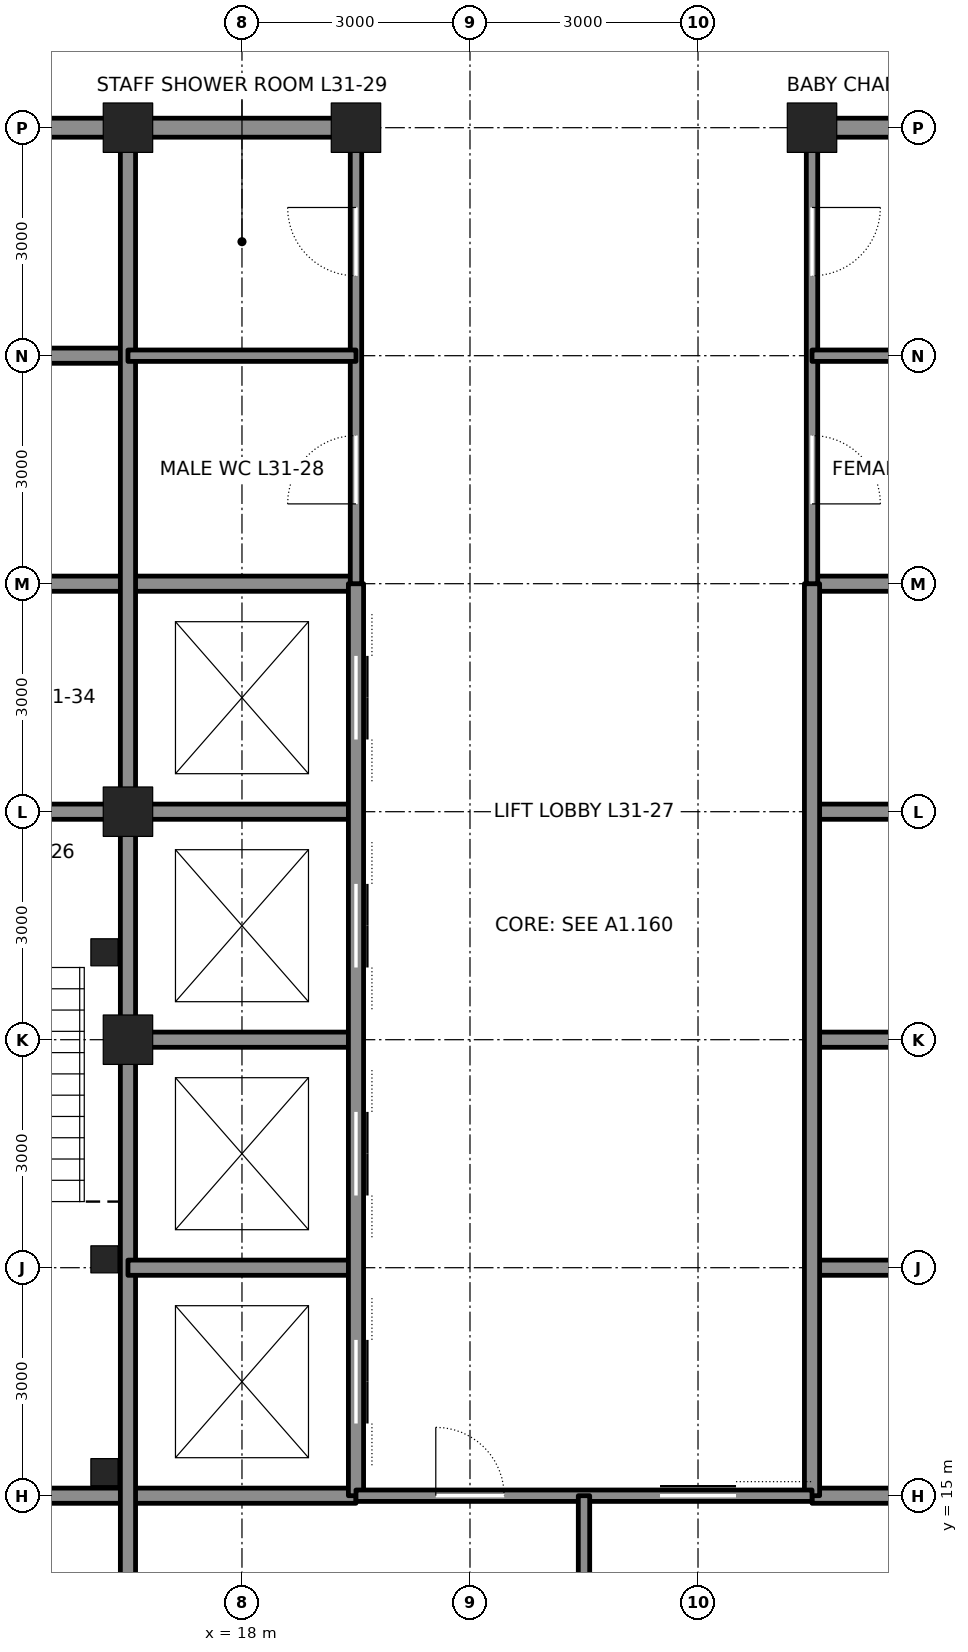
"""IFC4 building model, lengths in metres.
Left out: names, types, materials, properties, quantities, classifications, styles, units other than length and angle.
Written with IfcOpenShell. Run it as: python <this file> out.ifc"""

import sys

from ifc_helpers import new_model, si_unit, direction, frame, frame_2d, origin, origin_2d, place, context, subcontext, project, spatial, rectangle, hollow_rectangle, extrude, element, fill, save


model = new_model("IFC4")
c1 = context("Model", 3, precision=1e-05, world=origin(), true_north=direction((0.0, 1.0)))
c2 = subcontext(c1, "Body", "Model", "MODEL_VIEW")
j1 = project(units=[si_unit("LENGTHUNIT", "METRE"), si_unit("PLANEANGLEUNIT", "RADIAN")], contexts=[c1])
p1 = place(None, origin())
s1 = spatial("IfcSite", under=j1, at=p1, CompositionType="ELEMENT")
p2 = place(p1, origin())
s2 = spatial("IfcBuilding", under=s1, at=p2, CompositionType="ELEMENT")
p3 = place(p2, frame((0.0, 0.0, 144.6)))
s3 = spatial("IfcBuildingStorey", under=s2, at=p3, CompositionType="ELEMENT", Elevation=144.6)
for number, where, z_axis, x_axis in (
    (1, (16.5, 33.0, 0.0), (0.0, 0.0, 1.0), (1.0, 0.0, 0.0)),
    (2, (19.5, 33.0, 0.0), (0.0, 0.0, 1.0), (1.0, 0.0, 0.0)),
    (3, (25.5, 33.0, 0.0), (0.0, 0.0, 1.0), (1.0, 0.0, 0.0)),
    (4, (16.5, 21.0, 0.0), (0.0, 0.0, 1.0), (1.0, 0.0, 0.0)),
    (5, (16.5, 24.0, 0.0), (0.0, 0.0, 1.0), (1.0, 0.0, 0.0)),
):
    element("IfcColumn", number, at=place(p3, frame(where, z_axis=z_axis, x_axis=x_axis)), inside=s3, PredefinedType="COLUMN", context=c2, shape_type="SweptSolid", body=[
        extrude(hollow_rectangle(XDim=0.65, YDim=0.65, WallThickness=0.065, at=origin_2d()), origin(), (0.0, 0.0, 1.0), 4.2),
    ])
for number, where, z_axis, x_axis in (
    (6, (12.0, 15.0, 0.0), (0.0, 0.0, 1.0), (1.0, 0.0, 0.0)),
    (7, (25.5, 15.0, 0.0), (0.0, 0.0, 1.0), (1.0, 0.0, 0.0)),
):
    element("IfcWall", number, at=place(p3, frame(where, z_axis=z_axis, x_axis=x_axis)), inside=s3, PredefinedType="SOLIDWALL", context=c2, shape_type="SweptSolid", body=[
        extrude(rectangle(XDim=7.5, YDim=0.2, at=frame_2d((3.75, 0.0))), origin(), (0.0, 0.0, 1.0), 4.04),
    ])
p4 = place(p3, frame((12.25, 24.0, 0.0), z_axis=(0.0, 0.0, 1.0), x_axis=(1.0, 0.0, 0.0)))
e8 = element("IfcWall", 8, at=p4, inside=s3, PredefinedType="SOLIDWALL", context=c2, shape_type="SweptSolid", body=[
    extrude(rectangle(XDim=4.0, YDim=0.2, at=frame_2d((2.0, 0.0))), origin(), (0.0, 0.0, 1.0), 3.09),
])
p5 = place(p4, frame((1.4, 0.0, 0.0)))
e9 = element("IfcOpeningElement", 9, at=p5, cuts=e8, PredefinedType="OPENING", context=c2, shape_type="SweptSolid", body=[
    extrude(rectangle(XDim=1.2, YDim=2.1, at=frame_2d((0.6, 1.05))), frame((0.0, 0.11, 0.0), z_axis=(0.0, -1.0, 0.0), x_axis=(1.0, 0.0, 0.0)), (0.0, 0.0, 1.0), 0.22),
])
for number, where, z_axis, x_axis in (
    (10, (16.75, 24.0, 0.0), (0.0, 0.0, 1.0), (1.0, 0.0, 0.0)),
    (11, (25.5, 24.0, 0.0), (0.0, 0.0, 1.0), (1.0, 0.0, 0.0)),
):
    element("IfcWall", number, at=place(p3, frame(where, z_axis=z_axis, x_axis=x_axis)), inside=s3, PredefinedType="SOLIDWALL", context=c2, shape_type="SweptSolid", body=[
        extrude(rectangle(XDim=2.75, YDim=0.2, at=frame_2d((1.375, 0.0))), origin(), (0.0, 0.0, 1.0), 3.09),
    ])
p6 = place(p3, frame((12.0, 27.0, 0.0), z_axis=(0.0, 0.0, 1.0), x_axis=(1.0, 0.0, 0.0)))
e12 = element("IfcWall", 12, at=p6, inside=s3, PredefinedType="SOLIDWALL", context=c2, shape_type="SweptSolid", body=[
    extrude(rectangle(XDim=7.5, YDim=0.2, at=frame_2d((3.75, 0.0))), origin(), (0.0, 0.0, 1.0), 4.04),
])
p7 = place(p6, frame((1.65, 0.0, 0.0)))
e13 = element("IfcOpeningElement", 13, at=p7, cuts=e12, PredefinedType="OPENING", context=c2, shape_type="SweptSolid", body=[
    extrude(rectangle(XDim=1.2, YDim=2.1, at=frame_2d((0.6, 1.05))), frame((0.0, 0.11, 0.0), z_axis=(0.0, -1.0, 0.0), x_axis=(1.0, 0.0, 0.0)), (0.0, 0.0, 1.0), 0.22),
])
p8 = place(p3, frame((25.5, 27.0, 0.0), z_axis=(0.0, 0.0, 1.0), x_axis=(1.0, 0.0, 0.0)))
e14 = element("IfcWall", 14, at=p8, inside=s3, PredefinedType="SOLIDWALL", context=c2, shape_type="SweptSolid", body=[
    extrude(rectangle(XDim=3.0, YDim=0.2, at=frame_2d((1.5, 0.0))), origin(), (0.0, 0.0, 1.0), 4.04),
])
p9 = place(p3, frame((12.0, 30.0, 0.0), z_axis=(0.0, 0.0, 1.0), x_axis=(1.0, 0.0, 0.0)))
e15 = element("IfcWall", 15, at=p9, inside=s3, PredefinedType="SOLIDWALL", context=c2, shape_type="SweptSolid", body=[
    extrude(rectangle(XDim=4.5, YDim=0.2, at=frame_2d((2.25, 0.0))), origin(), (0.0, 0.0, 1.0), 4.04),
])
p10 = place(p3, frame((12.25, 33.0, 0.0), z_axis=(0.0, 0.0, 1.0), x_axis=(1.0, 0.0, 0.0)))
e16 = element("IfcWall", 16, at=p10, inside=s3, PredefinedType="SOLIDWALL", context=c2, shape_type="SweptSolid", body=[
    extrude(rectangle(XDim=4.0, YDim=0.25, at=frame_2d((2.0, 0.0))), origin(), (0.0, 0.0, 1.0), 3.181),
])
for number, where, z_axis, x_axis in (
    (17, (16.75, 33.0, 0.0), (0.0, 0.0, 1.0), (1.0, 0.0, 0.0)),
    (18, (25.75, 33.0, 0.0), (0.0, 0.0, 1.0), (1.0, 0.0, 0.0)),
):
    element("IfcWall", number, at=place(p3, frame(where, z_axis=z_axis, x_axis=x_axis)), inside=s3, PredefinedType="SOLIDWALL", context=c2, shape_type="SweptSolid", body=[
        extrude(rectangle(XDim=2.5, YDim=0.25, at=frame_2d((1.25, 0.0))), origin(), (0.0, 0.0, 1.0), 3.181),
    ])
p11 = place(p3, frame((16.5, 12.25, 0.0), z_axis=(0.0, 0.0, 1.0), x_axis=(0.0, 1.0, 0.0)))
e19 = element("IfcWall", 19, at=p11, inside=s3, PredefinedType="SOLIDWALL", context=c2, shape_type="SweptSolid", body=[
    extrude(rectangle(XDim=8.5, YDim=0.2, at=frame_2d((4.25, 0.0))), origin(), (0.0, 0.0, 1.0), 3.113),
])
p12 = place(p3, frame((16.5, 21.25, 0.0), z_axis=(0.0, 0.0, 1.0), x_axis=(0.0, 1.0, 0.0)))
e20 = element("IfcWall", 20, at=p12, inside=s3, PredefinedType="SOLIDWALL", context=c2, shape_type="SweptSolid", body=[
    extrude(rectangle(XDim=2.5, YDim=0.2, at=frame_2d((1.25, 0.0))), origin(), (0.0, 0.0, 1.0), 3.113),
])
p13 = place(p3, frame((16.5, 24.25, 0.0), z_axis=(0.0, 0.0, 1.0), x_axis=(0.0, 1.0, 0.0)))
e21 = element("IfcWall", 21, at=p13, inside=s3, PredefinedType="SOLIDWALL", context=c2, shape_type="SweptSolid", body=[
    extrude(rectangle(XDim=8.5, YDim=0.2, at=frame_2d((4.25, 0.0))), origin(), (0.0, 0.0, 1.0), 3.113),
])
p14 = place(p3, frame((16.5, 18.0, 0.0), z_axis=(0.0, 0.0, 1.0), x_axis=(1.0, 0.0, 0.0)))
e22 = element("IfcWall", 22, at=p14, inside=s3, PredefinedType="SOLIDWALL", context=c2, shape_type="SweptSolid", body=[
    extrude(rectangle(XDim=3.0, YDim=0.2, at=frame_2d((1.5, 0.0))), origin(), (0.0, 0.0, 1.0), 4.04),
])
p15 = place(p3, frame((25.5, 18.0, 0.0), z_axis=(0.0, 0.0, 1.0), x_axis=(1.0, 0.0, 0.0)))
e23 = element("IfcWall", 23, at=p15, inside=s3, PredefinedType="SOLIDWALL", context=c2, shape_type="SweptSolid", body=[
    extrude(rectangle(XDim=7.5, YDim=0.2, at=frame_2d((3.75, 0.0))), origin(), (0.0, 0.0, 1.0), 4.04),
])
p16 = place(p15, frame((4.65, 0.0, 0.0)))
e24 = element("IfcOpeningElement", 24, at=p16, cuts=e23, PredefinedType="OPENING", context=c2, shape_type="SweptSolid", body=[
    extrude(rectangle(XDim=1.2, YDim=2.1, at=frame_2d((0.6, 1.05))), frame((0.0, 0.11, 0.0), z_axis=(0.0, -1.0, 0.0), x_axis=(1.0, 0.0, 0.0)), (0.0, 0.0, 1.0), 0.22),
])
for number, where, z_axis, x_axis in (
    (25, (16.75, 21.0, 0.0), (0.0, 0.0, 1.0), (1.0, 0.0, 0.0)),
    (26, (25.5, 21.0, 0.0), (0.0, 0.0, 1.0), (1.0, 0.0, 0.0)),
):
    element("IfcWall", number, at=place(p3, frame(where, z_axis=z_axis, x_axis=x_axis)), inside=s3, PredefinedType="SOLIDWALL", context=c2, shape_type="SweptSolid", body=[
        extrude(rectangle(XDim=2.75, YDim=0.2, at=frame_2d((1.375, 0.0))), origin(), (0.0, 0.0, 1.0), 3.09),
    ])
p17 = place(p3, frame((19.5, 15.0, 0.0), z_axis=(0.0, 0.0, 1.0), x_axis=(0.0, 1.0, 0.0)))
e27 = element("IfcWall", 27, at=p17, inside=s3, PredefinedType="SOLIDWALL", context=c2, shape_type="SweptSolid", body=[
    extrude(rectangle(XDim=12.0, YDim=0.2, at=frame_2d((6.0, 0.0))), origin(), (0.0, 0.0, 1.0), 3.064),
])
p18 = place(p17, frame((0.95, 0.0, 0.0)))
e28 = element("IfcOpeningElement", 28, at=p18, cuts=e27, PredefinedType="OPENING", context=c2, shape_type="SweptSolid", body=[
    extrude(rectangle(XDim=1.1, YDim=2.1, at=frame_2d((0.55, 1.05))), frame((0.0, 0.11, 0.0), z_axis=(0.0, -1.0, 0.0), x_axis=(1.0, 0.0, 0.0)), (0.0, 0.0, 1.0), 0.22),
])
p19 = place(p17, frame((3.95, 0.0, 0.0)))
e29 = element("IfcOpeningElement", 29, at=p19, cuts=e27, PredefinedType="OPENING", context=c2, shape_type="SweptSolid", body=[
    extrude(rectangle(XDim=1.1, YDim=2.1, at=frame_2d((0.55, 1.05))), frame((0.0, 0.11, 0.0), z_axis=(0.0, -1.0, 0.0), x_axis=(1.0, 0.0, 0.0)), (0.0, 0.0, 1.0), 0.22),
])
p20 = place(p17, frame((6.95, 0.0, 0.0)))
e30 = element("IfcOpeningElement", 30, at=p20, cuts=e27, PredefinedType="OPENING", context=c2, shape_type="SweptSolid", body=[
    extrude(rectangle(XDim=1.1, YDim=2.1, at=frame_2d((0.55, 1.05))), frame((0.0, 0.11, 0.0), z_axis=(0.0, -1.0, 0.0), x_axis=(1.0, 0.0, 0.0)), (0.0, 0.0, 1.0), 0.22),
])
p21 = place(p17, frame((9.95, 0.0, 0.0)))
e31 = element("IfcOpeningElement", 31, at=p21, cuts=e27, PredefinedType="OPENING", context=c2, shape_type="SweptSolid", body=[
    extrude(rectangle(XDim=1.1, YDim=2.1, at=frame_2d((0.55, 1.05))), frame((0.0, 0.11, 0.0), z_axis=(0.0, -1.0, 0.0), x_axis=(1.0, 0.0, 0.0)), (0.0, 0.0, 1.0), 0.22),
])
p22 = place(p3, frame((19.5, 27.0, 0.0), z_axis=(0.0, 0.0, 1.0), x_axis=(0.0, 1.0, 0.0)))
e32 = element("IfcWall", 32, at=p22, inside=s3, PredefinedType="PARTITIONING", context=c2, shape_type="SweptSolid", body=[
    extrude(rectangle(XDim=5.75, YDim=0.15, at=frame_2d((2.875, 0.0))), origin(), (0.0, 0.0, 1.0), 3.064),
])
p23 = place(p22, frame((1.05, 0.0, 0.0)))
e33 = element("IfcOpeningElement", 33, at=p23, cuts=e32, PredefinedType="OPENING", context=c2, shape_type="SweptSolid", body=[
    extrude(rectangle(XDim=0.9, YDim=2.1, at=frame_2d((0.45, 1.05))), frame((0.0, 0.085, 0.0), z_axis=(0.0, -1.0, 0.0), x_axis=(1.0, 0.0, 0.0)), (0.0, 0.0, 1.0), 0.17),
])
p24 = place(p22, frame((4.05, 0.0, 0.0)))
e34 = element("IfcOpeningElement", 34, at=p24, cuts=e32, PredefinedType="OPENING", context=c2, shape_type="SweptSolid", body=[
    extrude(rectangle(XDim=0.9, YDim=2.1, at=frame_2d((0.45, 1.05))), frame((0.0, 0.085, 0.0), z_axis=(0.0, -1.0, 0.0), x_axis=(1.0, 0.0, 0.0)), (0.0, 0.0, 1.0), 0.17),
])
p25 = place(p3, frame((25.5, 15.0, 0.0), z_axis=(0.0, 0.0, 1.0), x_axis=(0.0, 1.0, 0.0)))
e35 = element("IfcWall", 35, at=p25, inside=s3, PredefinedType="SOLIDWALL", context=c2, shape_type="SweptSolid", body=[
    extrude(rectangle(XDim=12.0, YDim=0.2, at=frame_2d((6.0, 0.0))), origin(), (0.0, 0.0, 1.0), 3.064),
])
p26 = place(p3, frame((25.5, 27.0, 0.0), z_axis=(0.0, 0.0, 1.0), x_axis=(0.0, 1.0, 0.0)))
e36 = element("IfcWall", 36, at=p26, inside=s3, PredefinedType="PARTITIONING", context=c2, shape_type="SweptSolid", body=[
    extrude(rectangle(XDim=5.75, YDim=0.15, at=frame_2d((2.875, 0.0))), origin(), (0.0, 0.0, 1.0), 3.064),
])
p27 = place(p26, frame((1.05, 0.0, 0.0)))
e37 = element("IfcOpeningElement", 37, at=p27, cuts=e36, PredefinedType="OPENING", context=c2, shape_type="SweptSolid", body=[
    extrude(rectangle(XDim=0.9, YDim=2.1, at=frame_2d((0.45, 1.05))), frame((0.0, 0.085, 0.0), z_axis=(0.0, -1.0, 0.0), x_axis=(1.0, 0.0, 0.0)), (0.0, 0.0, 1.0), 0.17),
])
p28 = place(p26, frame((4.05, 0.0, 0.0)))
e38 = element("IfcOpeningElement", 38, at=p28, cuts=e36, PredefinedType="OPENING", context=c2, shape_type="SweptSolid", body=[
    extrude(rectangle(XDim=0.9, YDim=2.1, at=frame_2d((0.45, 1.05))), frame((0.0, 0.085, 0.0), z_axis=(0.0, -1.0, 0.0), x_axis=(1.0, 0.0, 0.0)), (0.0, 0.0, 1.0), 0.17),
])
p29 = place(p3, frame((19.5, 15.0, 0.0), z_axis=(0.0, 0.0, 1.0), x_axis=(1.0, 0.0, 0.0)))
e39 = element("IfcWall", 39, at=p29, inside=s3, PredefinedType="PARTITIONING", context=c2, shape_type="SweptSolid", body=[
    extrude(rectangle(XDim=6.0, YDim=0.15, at=frame_2d((3.0, 0.0))), origin(), (0.0, 0.0, 1.0), 4.04),
])
p30 = place(p29, frame((4.0, 0.0, 0.0)))
e40 = element("IfcOpeningElement", 40, at=p30, cuts=e39, PredefinedType="OPENING", context=c2, shape_type="SweptSolid", body=[
    extrude(rectangle(XDim=1.0, YDim=2.1, at=frame_2d((0.5, 1.05))), frame((0.0, 0.085, 0.0), z_axis=(0.0, -1.0, 0.0), x_axis=(1.0, 0.0, 0.0)), (0.0, 0.0, 1.0), 0.17),
])
p31 = place(p29, frame((1.05, 0.0, 0.0)))
e41 = element("IfcOpeningElement", 41, at=p31, cuts=e39, PredefinedType="OPENING", context=c2, shape_type="SweptSolid", body=[
    extrude(rectangle(XDim=0.9, YDim=2.1, at=frame_2d((0.45, 1.05))), frame((0.0, 0.085, 0.0), z_axis=(0.0, -1.0, 0.0), x_axis=(1.0, 0.0, 0.0)), (0.0, 0.0, 1.0), 0.17),
])
for number, where, z_axis, x_axis in (
    (42, (22.5, 15.0, 0.0), (0.0, 0.0, 1.0), (0.0, -1.0, 0.0)),
    (43, (16.5, 30.0, 0.0), (0.0, 0.0, 1.0), (1.0, 0.0, 0.0)),
    (44, (25.5, 30.0, 0.0), (0.0, 0.0, 1.0), (1.0, 0.0, 0.0)),
):
    element("IfcWall", number, at=place(p3, frame(where, z_axis=z_axis, x_axis=x_axis)), inside=s3, PredefinedType="PARTITIONING", context=c2, shape_type="SweptSolid", body=[
        extrude(rectangle(XDim=3.0, YDim=0.15, at=frame_2d((1.5, 0.0))), origin(), (0.0, 0.0, 1.0), 4.04),
    ])
for number, where, z_axis, x_axis in (
    (45, (16.19, 15.31, 0.0), (0.0, 0.0, 1.0), (1.0, 0.0, 0.0)),
    (46, (16.19, 18.11, 0.0), (0.0, 0.0, 1.0), (1.0, 0.0, 0.0)),
    (47, (16.19, 22.15, 0.0), (0.0, 0.0, 1.0), (1.0, 0.0, 0.0)),
):
    element("IfcColumn", number, at=place(p3, frame(where, z_axis=z_axis, x_axis=x_axis)), inside=s3, PredefinedType="COLUMN", context=c2, shape_type="SweptSolid", body=[
        extrude(hollow_rectangle(XDim=0.356, YDim=0.356, WallThickness=0.015, at=origin_2d()), origin(), (0.0, 0.0, 1.0), 4.2),
    ])
p32 = place(p23, origin())
e48 = element("IfcDoor", 48, at=p32, inside=s3, OperationType="SINGLE_SWING_LEFT", PredefinedType="DOOR", context=c2, shape_type="SweptSolid", body=[
    extrude(rectangle(XDim=0.9, YDim=2.1, at=frame_2d((0.45, 1.05))), frame((0.0, 0.025, 0.0), z_axis=(0.0, -1.0, 0.0), x_axis=(1.0, 0.0, 0.0)), (0.0, 0.0, 1.0), 0.05),
])
fill(e33, e48)
p33 = place(p24, origin())
e49 = element("IfcDoor", 49, at=p33, inside=s3, OperationType="SINGLE_SWING_RIGHT", PredefinedType="DOOR", context=c2, shape_type="SweptSolid", body=[
    extrude(rectangle(XDim=0.9, YDim=2.1, at=frame_2d((0.45, 1.05))), frame((0.0, 0.025, 0.0), z_axis=(0.0, -1.0, 0.0), x_axis=(1.0, 0.0, 0.0)), (0.0, 0.0, 1.0), 0.05),
])
fill(e34, e49)
p34 = place(p27, frame((0.9, 0.0, 0.0), z_axis=(0.0, 0.0, 1.0), x_axis=(-1.0, 0.0, 0.0)))
e50 = element("IfcDoor", 50, at=p34, inside=s3, OperationType="SINGLE_SWING_RIGHT", PredefinedType="DOOR", context=c2, shape_type="SweptSolid", body=[
    extrude(rectangle(XDim=0.9, YDim=2.1, at=frame_2d((0.45, 1.05))), frame((0.0, 0.025, 0.0), z_axis=(0.0, -1.0, 0.0), x_axis=(1.0, 0.0, 0.0)), (0.0, 0.0, 1.0), 0.05),
])
fill(e37, e50)
p35 = place(p28, frame((0.9, 0.0, 0.0), z_axis=(0.0, 0.0, 1.0), x_axis=(-1.0, 0.0, 0.0)))
e51 = element("IfcDoor", 51, at=p35, inside=s3, OperationType="SINGLE_SWING_LEFT", PredefinedType="DOOR", context=c2, shape_type="SweptSolid", body=[
    extrude(rectangle(XDim=0.9, YDim=2.1, at=frame_2d((0.45, 1.05))), frame((0.0, 0.025, 0.0), z_axis=(0.0, -1.0, 0.0), x_axis=(1.0, 0.0, 0.0)), (0.0, 0.0, 1.0), 0.05),
])
fill(e38, e51)
p36 = place(p30, origin())
e52 = element("IfcDoor", 52, at=p36, inside=s3, OperationType="SLIDING_TO_LEFT", PredefinedType="DOOR", context=c2, shape_type="SweptSolid", body=[
    extrude(rectangle(XDim=1.0, YDim=2.1, at=frame_2d((0.5, 1.05))), frame((0.0, 0.025, 0.0), z_axis=(0.0, -1.0, 0.0), x_axis=(1.0, 0.0, 0.0)), (0.0, 0.0, 1.0), 0.05),
])
fill(e40, e52)
p37 = place(p31, origin())
e53 = element("IfcDoor", 53, at=p37, inside=s3, OperationType="SINGLE_SWING_LEFT", PredefinedType="DOOR", context=c2, shape_type="SweptSolid", body=[
    extrude(rectangle(XDim=0.9, YDim=2.1, at=frame_2d((0.45, 1.05))), frame((0.0, 0.025, 0.0), z_axis=(0.0, -1.0, 0.0), x_axis=(1.0, 0.0, 0.0)), (0.0, 0.0, 1.0), 0.05),
])
fill(e41, e53)
p38 = place(p18, origin())
e54 = element("IfcDoor", 54, at=p38, inside=s3, OperationType="DOUBLE_DOOR_SLIDING", PredefinedType="DOOR", context=c2, shape_type="SweptSolid", body=[
    extrude(rectangle(XDim=1.1, YDim=2.1, at=frame_2d((0.55, 1.05))), frame((0.0, 0.025, 0.0), z_axis=(0.0, -1.0, 0.0), x_axis=(1.0, 0.0, 0.0)), (0.0, 0.0, 1.0), 0.05),
])
fill(e28, e54)
p39 = place(p19, origin())
e55 = element("IfcDoor", 55, at=p39, inside=s3, OperationType="DOUBLE_DOOR_SLIDING", PredefinedType="DOOR", context=c2, shape_type="SweptSolid", body=[
    extrude(rectangle(XDim=1.1, YDim=2.1, at=frame_2d((0.55, 1.05))), frame((0.0, 0.025, 0.0), z_axis=(0.0, -1.0, 0.0), x_axis=(1.0, 0.0, 0.0)), (0.0, 0.0, 1.0), 0.05),
])
fill(e29, e55)
p40 = place(p20, origin())
e56 = element("IfcDoor", 56, at=p40, inside=s3, OperationType="DOUBLE_DOOR_SLIDING", PredefinedType="DOOR", context=c2, shape_type="SweptSolid", body=[
    extrude(rectangle(XDim=1.1, YDim=2.1, at=frame_2d((0.55, 1.05))), frame((0.0, 0.025, 0.0), z_axis=(0.0, -1.0, 0.0), x_axis=(1.0, 0.0, 0.0)), (0.0, 0.0, 1.0), 0.05),
])
fill(e30, e56)
p41 = place(p21, origin())
e57 = element("IfcDoor", 57, at=p41, inside=s3, OperationType="DOUBLE_DOOR_SLIDING", PredefinedType="DOOR", context=c2, shape_type="SweptSolid", body=[
    extrude(rectangle(XDim=1.1, YDim=2.1, at=frame_2d((0.55, 1.05))), frame((0.0, 0.025, 0.0), z_axis=(0.0, -1.0, 0.0), x_axis=(1.0, 0.0, 0.0)), (0.0, 0.0, 1.0), 0.05),
])
fill(e31, e57)
save(model, sys.argv[1])
